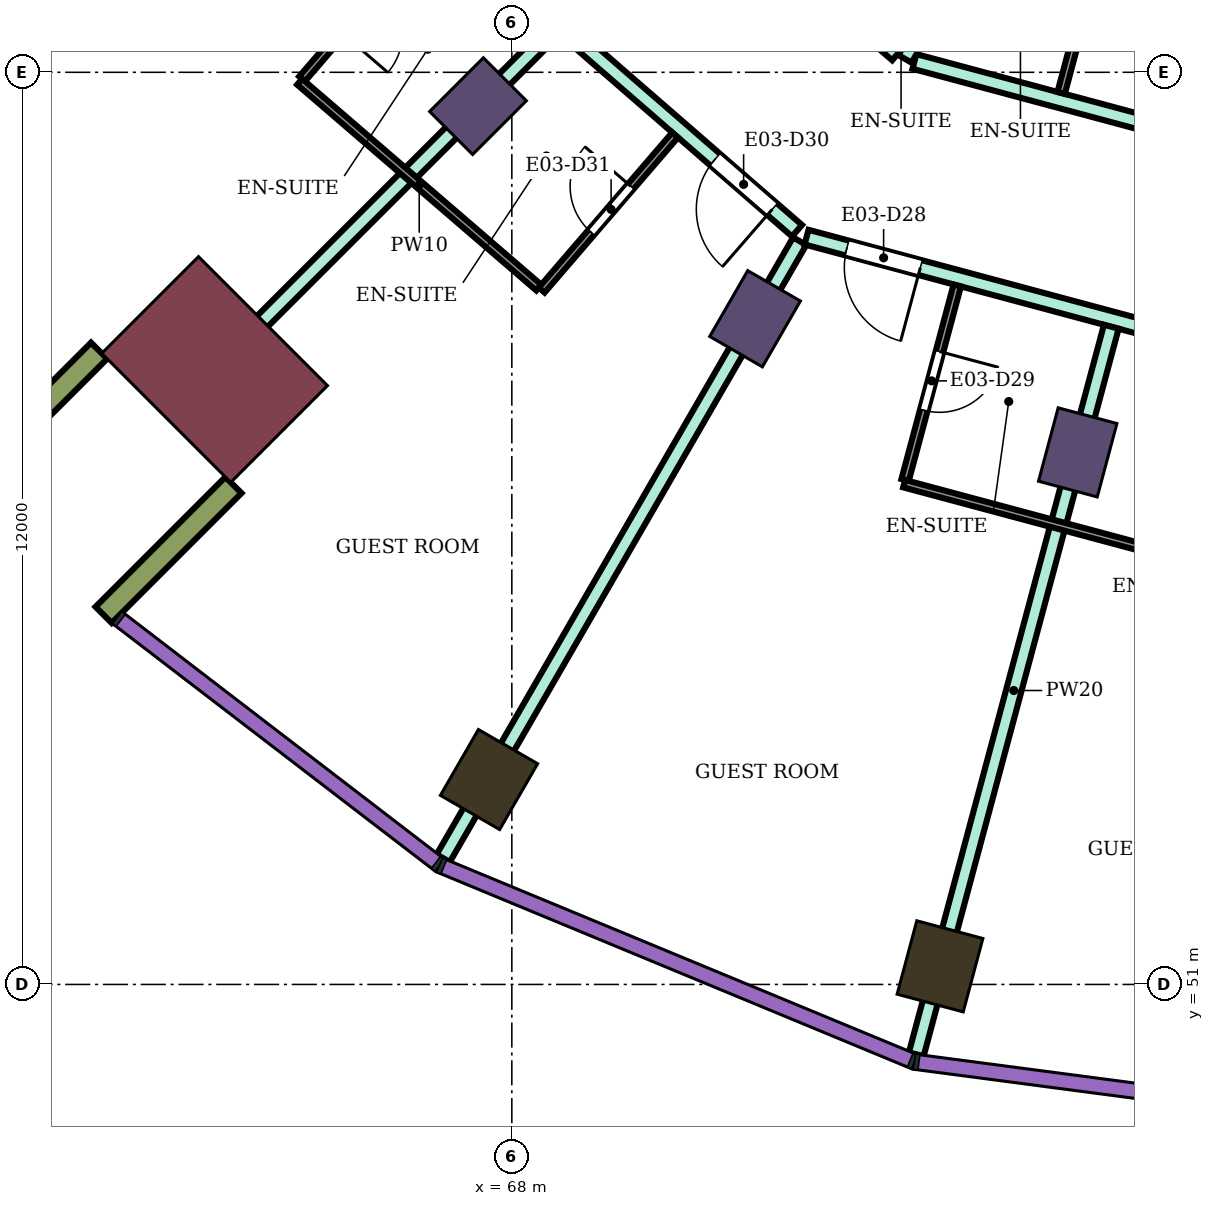
"""IFC4 building model, lengths in metres.
Left out: names, types, materials, properties, quantities, classifications, styles, units other than length and angle.
Written with IfcOpenShell. Run it as: python <this file> out.ifc"""

import sys

from ifc_helpers import new_model, si_unit, direction, frame, frame_2d, origin, origin_2d, place, context, subcontext, project, spatial, rectangle, extrude, element, fill, save


model = new_model("IFC4")
c1 = context("Model", 3, precision=1e-05, world=origin(), true_north=direction((0.0, 1.0)))
c2 = subcontext(c1, "Body", "Model", "MODEL_VIEW")
j1 = project(units=[si_unit("LENGTHUNIT", "METRE"), si_unit("PLANEANGLEUNIT", "RADIAN")], contexts=[c1])
p1 = place(None, origin())
s1 = spatial("IfcSite", under=j1, at=p1, CompositionType="ELEMENT")
p2 = place(p1, origin())
s2 = spatial("IfcBuilding", under=s1, at=p2, CompositionType="ELEMENT")
p3 = place(p2, frame((0.0, 0.0, 145.8)))
s3 = spatial("IfcBuildingStorey", under=s2, at=p3, CompositionType="ELEMENT", Elevation=145.8)
for number, where, z_axis, x_axis in (
    (1, (67.7, 53.696, 0.0), (0.0, 0.0, 1.0), (-0.5, -0.866, 0.0)),
    (2, (73.633, 51.238, 0.0), (0.0, 0.0, 1.0), (-0.259, -0.966, 0.0)),
):
    element("IfcColumn", number, at=place(p3, frame(where, z_axis=z_axis, x_axis=x_axis)), inside=s3, PredefinedType="COLUMN", context=c2, shape_type="SweptSolid", body=[
        extrude(rectangle(XDim=1.0, YDim=0.9, at=origin_2d()), origin(), (0.0, 0.0, 1.0), 3.9),
    ])
for number, where, z_axis, x_axis in (
    (3, (67.555, 62.555, 0.0), (0.0, 0.0, 1.0), (-0.707, -0.707, 0.0)),
    (4, (71.2, 59.758, 0.0), (0.0, 0.0, 1.0), (-0.5, -0.866, 0.0)),
    (5, (75.445, 58.0, 0.0), (0.0, 0.0, 1.0), (-0.259, -0.966, 0.0)),
):
    element("IfcColumn", number, at=place(p3, frame(where, z_axis=z_axis, x_axis=x_axis)), inside=s3, PredefinedType="COLUMN", context=c2, shape_type="SweptSolid", body=[
        extrude(rectangle(XDim=1.0, YDim=0.8, at=origin_2d()), origin(), (0.0, 0.0, 1.0), 3.9),
    ])
p4 = place(p3, frame((64.09, 59.09, 0.0), z_axis=(0.0, 0.0, 1.0), x_axis=(-0.707106781187, -0.707106781187, 0.0)))
e6 = element("IfcColumn", 6, at=p4, inside=s3, PredefinedType="COLUMN", context=c2, shape_type="SweptSolid", body=[
    extrude(rectangle(XDim=1.8, YDim=2.4, at=origin_2d()), origin(), (0.0, 0.0, 1.0), 3.9),
])
for number, where, z_axis, x_axis in (
    (7, (62.57, 59.338, 0.0), (0.0, 0.0, 1.0), (-0.707, -0.707, 0.0)),
    (8, (64.338, 57.57, 0.0), (0.0, 0.0, 1.0), (-0.707, -0.707, 0.0)),
):
    element("IfcWall", number, at=place(p3, frame(where, z_axis=z_axis, x_axis=x_axis)), inside=s3, PredefinedType="NOTDEFINED", context=c2, shape_type="SweptSolid", body=[
        extrude(rectangle(XDim=2.416, YDim=0.3, at=frame_2d((1.208, 0.0))), origin(), (0.0, 0.0, 1.0), 3.9),
    ])
p5 = place(p3, frame((63.593, 58.599, 0.0), z_axis=(0.0, 0.0, 1.0), x_axis=(0.707228748718, 0.706984792613, 0.0)))
e9 = element("IfcWall", 9, at=p5, inside=s3, PredefinedType="PARTITIONING", context=c2, shape_type="SweptSolid", body=[
    extrude(rectangle(XDim=7.005, YDim=0.2, at=frame_2d((3.503, 0.0))), origin(), (0.0, 0.0, 1.0), 3.45),
])
p6 = place(p3, frame((67.082, 64.972, 0.0), z_axis=(0.0, 0.0, 1.0), x_axis=(0.755031061605, -0.65568902386, 0.0)))
e10 = element("IfcWall", 10, at=p6, inside=s3, PredefinedType="PARTITIONING", context=c2, shape_type="SweptSolid", body=[
    extrude(rectangle(XDim=6.186, YDim=0.2, at=frame_2d((3.093, 0.0))), origin(), (0.0, 0.0, 1.0), 3.45),
])
p7 = place(p6, frame((4.755, 0.0, 0.0)))
e11 = element("IfcOpeningElement", 11, at=p7, cuts=e10, PredefinedType="OPENING", context=c2, shape_type="SweptSolid", body=[
    extrude(rectangle(XDim=1.0, YDim=2.1, at=frame_2d((0.5, 1.05))), frame((0.0, 0.11, 0.0), z_axis=(0.0, -1.0, 0.0), x_axis=(1.0, 0.0, 0.0)), (0.0, 0.0, 1.0), 0.22),
])
p8 = place(p3, frame((67.097, 52.661, 0.0), z_axis=(0.0, 0.0, 1.0), x_axis=(0.500236379769, 0.865888886841, 0.0)))
e12 = element("IfcWall", 12, at=p8, inside=s3, PredefinedType="PARTITIONING", context=c2, shape_type="SweptSolid", body=[
    extrude(rectangle(XDim=9.375, YDim=0.2, at=frame_2d((4.688, 0.0))), origin(), (0.0, 0.0, 1.0), 3.45),
])
p9 = place(p3, frame((69.158, 66.6, 0.0), z_axis=(0.0, 0.0, 1.0), x_axis=(0.757976058094, -0.652282373943, 0.0)))
e13 = element("IfcWall", 13, at=p9, inside=s3, PredefinedType="PARTITIONING", context=c2, shape_type="SweptSolid", body=[
    extrude(rectangle(XDim=5.16, YDim=0.2, at=frame_2d((2.58, 0.0))), origin(), (0.0, 0.0, 1.0), 3.45),
])
p10 = place(p9, frame((1.6, 0.0, 0.0)))
e14 = element("IfcOpeningElement", 14, at=p10, cuts=e13, PredefinedType="OPENING", context=c2, shape_type="SweptSolid", body=[
    extrude(rectangle(XDim=1.0, YDim=2.1, at=frame_2d((0.5, 1.05))), frame((0.0, 0.11, 0.0), z_axis=(0.0, -1.0, 0.0), x_axis=(1.0, 0.0, 0.0)), (0.0, 0.0, 1.0), 0.22),
])
p11 = place(p3, frame((71.877, 60.832, 0.0), z_axis=(0.0, 0.0, 1.0), x_axis=(0.965852509869, -0.259092510851, 0.0)))
e15 = element("IfcWall", 15, at=p11, inside=s3, PredefinedType="PARTITIONING", context=c2, shape_type="SweptSolid", body=[
    extrude(rectangle(XDim=8.32, YDim=0.2, at=frame_2d((4.16, 0.0))), origin(), (0.0, 0.0, 1.0), 3.45),
])
p12 = place(p11, frame((6.86, 0.0, 0.0)))
e16 = element("IfcOpeningElement", 16, at=p12, cuts=e15, PredefinedType="OPENING", context=c2, shape_type="SweptSolid", body=[
    extrude(rectangle(XDim=1.0, YDim=2.1, at=frame_2d((0.5, 1.05))), frame((0.0, 0.11, 0.0), z_axis=(0.0, -1.0, 0.0), x_axis=(1.0, 0.0, 0.0)), (0.0, 0.0, 1.0), 0.22),
])
p13 = place(p11, frame((0.55, 0.0, 0.0)))
e17 = element("IfcOpeningElement", 17, at=p13, cuts=e15, PredefinedType="OPENING", context=c2, shape_type="SweptSolid", body=[
    extrude(rectangle(XDim=1.0, YDim=2.1, at=frame_2d((0.5, 1.05))), frame((0.0, 0.11, 0.0), z_axis=(0.0, -1.0, 0.0), x_axis=(1.0, 0.0, 0.0)), (0.0, 0.0, 1.0), 0.22),
])
p14 = place(p3, frame((73.297, 63.143, 0.0), z_axis=(0.0, 0.0, 1.0), x_axis=(0.965859030528, -0.25906820173, 0.0)))
e18 = element("IfcWall", 18, at=p14, inside=s3, PredefinedType="PARTITIONING", context=c2, shape_type="SweptSolid", body=[
    extrude(rectangle(XDim=6.81, YDim=0.2, at=frame_2d((3.405, 0.0))), origin(), (0.0, 0.0, 1.0), 3.45),
])
p15 = place(p14, frame((5.39, 0.0, 0.0)))
e19 = element("IfcOpeningElement", 19, at=p15, cuts=e18, PredefinedType="OPENING", context=c2, shape_type="SweptSolid", body=[
    extrude(rectangle(XDim=1.0, YDim=2.1, at=frame_2d((0.5, 1.05))), frame((0.0, 0.11, 0.0), z_axis=(0.0, -1.0, 0.0), x_axis=(1.0, 0.0, 0.0)), (0.0, 0.0, 1.0), 0.22),
])
p16 = place(p3, frame((73.173, 63.176, 0.0), z_axis=(0.0, 0.0, 1.0), x_axis=(0.500239348149, 0.865887171959, 0.0)))
e20 = element("IfcWall", 20, at=p16, inside=s3, PredefinedType="PARTITIONING", context=c2, shape_type="SweptSolid", body=[
    extrude(rectangle(XDim=5.955, YDim=0.2, at=frame_2d((2.978, 0.0))), origin(), (0.0, 0.0, 1.0), 3.45),
])
p17 = place(p3, frame((73.321, 50.081, 0.0), z_axis=(0.0, 0.0, 1.0), x_axis=(0.258889198551, 0.965907025999, 0.0)))
e21 = element("IfcWall", 21, at=p17, inside=s3, PredefinedType="PARTITIONING", context=c2, shape_type="SweptSolid", body=[
    extrude(rectangle(XDim=9.909, YDim=0.2, at=frame_2d((4.955, 0.0))), origin(), (0.0, 0.0, 1.0), 3.45),
])
p18 = place(p3, frame((65.24, 62.913, 0.0), z_axis=(0.0, 0.0, 1.0), x_axis=(0.652069888227, 0.758158862553, 0.0)))
e22 = element("IfcWall", 22, at=p18, inside=s3, PredefinedType="PARTITIONING", context=c2, shape_type="SweptSolid", body=[
    extrude(rectangle(XDim=2.75, YDim=0.1, at=frame_2d((1.375, 0.0))), origin(), (0.0, 0.0, 1.0), 3.45),
])
p19 = place(p18, frame((0.8, 0.0, 0.0)))
e23 = element("IfcOpeningElement", 23, at=p19, cuts=e22, PredefinedType="OPENING", context=c2, shape_type="SweptSolid", body=[
    extrude(rectangle(XDim=0.8, YDim=2.1, at=frame_2d((0.4, 1.05))), frame((0.0, 0.06, 0.0), z_axis=(0.0, -1.0, 0.0), x_axis=(1.0, 0.0, 0.0)), (0.0, 0.0, 1.0), 0.12),
])
p20 = place(p3, frame((65.208, 62.875, 0.0), z_axis=(0.0, 0.0, 1.0), x_axis=(0.757943251005, -0.652320495045, 0.0)))
e24 = element("IfcWall", 24, at=p20, inside=s3, PredefinedType="PARTITIONING", context=c2, shape_type="SweptSolid", body=[
    extrude(rectangle(XDim=4.151, YDim=0.1, at=frame_2d((2.076, 0.0))), origin(), (0.0, 0.0, 1.0), 3.45),
])
p21 = place(p3, frame((68.393, 60.135, 0.0), z_axis=(0.0, 0.0, 1.0), x_axis=(0.652061182569, 0.758166349944, 0.0)))
e25 = element("IfcWall", 25, at=p21, inside=s3, PredefinedType="PARTITIONING", context=c2, shape_type="SweptSolid", body=[
    extrude(rectangle(XDim=2.69, YDim=0.1, at=frame_2d((1.345, 0.0))), origin(), (0.0, 0.0, 1.0), 3.45),
])
p22 = place(p21, frame((1.0, 0.0, 0.0)))
e26 = element("IfcOpeningElement", 26, at=p22, cuts=e25, PredefinedType="OPENING", context=c2, shape_type="SweptSolid", body=[
    extrude(rectangle(XDim=0.8, YDim=2.1, at=frame_2d((0.4, 1.05))), frame((0.0, 0.06, 0.0), z_axis=(0.0, -1.0, 0.0), x_axis=(1.0, 0.0, 0.0)), (0.0, 0.0, 1.0), 0.12),
])
p23 = place(p3, frame((73.174, 57.636, 0.0), z_axis=(0.0, 0.0, 1.0), x_axis=(0.258952498977, 0.96589005755, 0.0)))
e27 = element("IfcWall", 27, at=p23, inside=s3, PredefinedType="PARTITIONING", context=c2, shape_type="SweptSolid", body=[
    extrude(rectangle(XDim=2.65, YDim=0.1, at=frame_2d((1.325, 0.0))), origin(), (0.0, 0.0, 1.0), 3.45),
])
p24 = place(p23, frame((0.95, 0.0, 0.0)))
e28 = element("IfcOpeningElement", 28, at=p24, cuts=e27, PredefinedType="OPENING", context=c2, shape_type="SweptSolid", body=[
    extrude(rectangle(XDim=0.8, YDim=2.1, at=frame_2d((0.4, 1.05))), frame((0.0, 0.06, 0.0), z_axis=(0.0, -1.0, 0.0), x_axis=(1.0, 0.0, 0.0)), (0.0, 0.0, 1.0), 0.12),
])
p25 = place(p3, frame((73.161, 57.588, 0.0), z_axis=(0.0, 0.0, 1.0), x_axis=(0.965858994467, -0.259068336173, 0.0)))
e29 = element("IfcWall", 29, at=p25, inside=s3, PredefinedType="PARTITIONING", context=c2, shape_type="SweptSolid", body=[
    extrude(rectangle(XDim=4.15, YDim=0.1, at=frame_2d((2.075, 0.0))), origin(), (0.0, 0.0, 1.0), 3.45),
])
p26 = place(p3, frame((75.227, 62.729, 0.0), z_axis=(0.0, 0.0, 1.0), x_axis=(0.258945475746, 0.965891940432, 0.0)))
e30 = element("IfcWall", 30, at=p26, inside=s3, PredefinedType="PARTITIONING", context=c2, shape_type="SweptSolid", body=[
    extrude(rectangle(XDim=2.7, YDim=0.1, at=frame_2d((1.35, 0.0))), origin(), (0.0, 0.0, 1.0), 3.45),
])
p27 = place(p26, frame((0.9, 0.0, 0.0)))
e31 = element("IfcOpeningElement", 31, at=p27, cuts=e30, PredefinedType="OPENING", context=c2, shape_type="SweptSolid", body=[
    extrude(rectangle(XDim=0.8, YDim=2.1, at=frame_2d((0.4, 1.05))), frame((0.0, 0.06, 0.0), z_axis=(0.0, -1.0, 0.0), x_axis=(1.0, 0.0, 0.0)), (0.0, 0.0, 1.0), 0.12),
])
p28 = place(p13, frame((1.0, 0.0, 0.0), z_axis=(0.0, 0.0, 1.0), x_axis=(-1.0, 0.0, 0.0)))
e32 = element("IfcDoor", 32, at=p28, inside=s3, OperationType="SINGLE_SWING_LEFT", PredefinedType="DOOR", context=c2, shape_type="SweptSolid", body=[
    extrude(rectangle(XDim=1.0, YDim=2.1, at=frame_2d((0.5, 1.05))), frame((0.0, 0.025, 0.0), z_axis=(0.0, -1.0, 0.0), x_axis=(1.0, 0.0, 0.0)), (0.0, 0.0, 1.0), 0.05),
])
fill(e17, e32)
p29 = place(p24, frame((0.8, 0.0, 0.0), z_axis=(0.0, 0.0, 1.0), x_axis=(-1.0, 0.0, 0.0)))
e33 = element("IfcDoor", 33, at=p29, inside=s3, OperationType="SINGLE_SWING_LEFT", PredefinedType="DOOR", context=c2, shape_type="SweptSolid", body=[
    extrude(rectangle(XDim=0.8, YDim=2.1, at=frame_2d((0.4, 1.05))), frame((0.0, 0.025, 0.0), z_axis=(0.0, -1.0, 0.0), x_axis=(1.0, 0.0, 0.0)), (0.0, 0.0, 1.0), 0.05),
])
fill(e28, e33)
p30 = place(p7, frame((1.0, 0.0, 0.0), z_axis=(0.0, 0.0, 1.0), x_axis=(-1.0, 0.0, 0.0)))
e34 = element("IfcDoor", 34, at=p30, inside=s3, OperationType="SINGLE_SWING_LEFT", PredefinedType="DOOR", context=c2, shape_type="SweptSolid", body=[
    extrude(rectangle(XDim=1.0, YDim=2.1, at=frame_2d((0.5, 1.05))), frame((0.0, 0.025, 0.0), z_axis=(0.0, -1.0, 0.0), x_axis=(1.0, 0.0, 0.0)), (0.0, 0.0, 1.0), 0.05),
])
fill(e11, e34)
p31 = place(p22, origin())
e35 = element("IfcDoor", 35, at=p31, inside=s3, OperationType="SINGLE_SWING_RIGHT", PredefinedType="DOOR", context=c2, shape_type="SweptSolid", body=[
    extrude(rectangle(XDim=0.8, YDim=2.1, at=frame_2d((0.4, 1.05))), frame((0.0, 0.025, 0.0), z_axis=(0.0, -1.0, 0.0), x_axis=(1.0, 0.0, 0.0)), (0.0, 0.0, 1.0), 0.05),
])
fill(e26, e35)
save(model, sys.argv[1])
